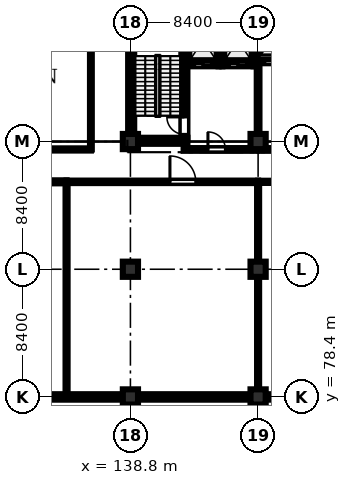
"""IFC4 building model, lengths in metres.
Left out: names, types, materials, properties, quantities, classifications, styles, units other than length and angle.
Written with IfcOpenShell. Run it as: python <this file> out.ifc"""

import sys

from ifc_helpers import new_model, si_unit, direction, frame, frame_2d, origin, origin_2d, place, context, subcontext, project, spatial, rectangle, extrude, element, fill, save


model = new_model("IFC4")
c1 = context("Model", 3, precision=1e-05, world=origin(), true_north=direction((0.0, 1.0)))
c2 = subcontext(c1, "Body", "Model", "MODEL_VIEW")
j1 = project(units=[si_unit("LENGTHUNIT", "METRE"), si_unit("PLANEANGLEUNIT", "RADIAN")], contexts=[c1])
p1 = place(None, origin())
s1 = spatial("IfcSite", under=j1, at=p1, CompositionType="ELEMENT")
p2 = place(p1, origin())
s2 = spatial("IfcBuilding", under=s1, at=p2, CompositionType="ELEMENT")
p3 = place(p2, frame((0.0, 0.0, 5.4)))
s3 = spatial("IfcBuildingStorey", under=s2, at=p3, CompositionType="ELEMENT", Elevation=5.4)
for number, where, z_axis, x_axis in (
    (1, (138.8, 78.4, 0.0), (0.0, 0.0, 1.0), (1.0, 0.0, 0.0)),
    (2, (138.8, 86.8, 0.0), (0.0, 0.0, 1.0), (1.0, 0.0, 0.0)),
    (3, (138.8, 95.2, 0.0), (0.0, 0.0, 1.0), (1.0, 0.0, 0.0)),
    (4, (147.2, 78.4, 0.0), (0.0, 0.0, 1.0), (1.0, 0.0, 0.0)),
    (5, (147.2, 86.8, 0.0), (0.0, 0.0, 1.0), (1.0, 0.0, 0.0)),
    (6, (147.2, 95.2, 0.0), (0.0, 0.0, 1.0), (1.0, 0.0, 0.0)),
):
    element("IfcColumn", number, at=place(p3, frame(where, z_axis=z_axis, x_axis=x_axis)), inside=s3, PredefinedType="COLUMN", context=c2, shape_type="SweptSolid", body=[
        extrude(rectangle(XDim=1.0, YDim=1.0, at=origin_2d()), origin(), (0.0, 0.0, 1.0), 4.58),
    ])
p4 = place(p3, frame((138.65, 95.25, 0.0), z_axis=(0.0, 0.0, 1.0), x_axis=(1.0, 0.0, 0.0)))
e7 = element("IfcWall", 7, at=p4, inside=s3, PredefinedType="SHEAR", context=c2, shape_type="SweptSolid", body=[
    extrude(rectangle(XDim=3.9, YDim=0.4, at=frame_2d((1.95, 0.0))), origin(), (0.0, 0.0, 1.0), 4.58),
])
p5 = place(p3, frame((138.85, 95.45, 0.0), z_axis=(0.0, 0.0, 1.0), x_axis=(0.0, 1.0, 0.0)))
e8 = element("IfcWall", 8, at=p5, inside=s3, PredefinedType="SHEAR", context=c2, shape_type="SweptSolid", body=[
    extrude(rectangle(XDim=7.9, YDim=0.4, at=frame_2d((3.95, 0.0))), origin(), (0.0, 0.0, 1.0), 4.58),
])
p6 = place(p3, frame((142.35, 95.45, 0.0), z_axis=(0.0, 0.0, 1.0), x_axis=(0.0, 1.0, 0.0)))
e9 = element("IfcWall", 9, at=p6, inside=s3, PredefinedType="SHEAR", context=c2, shape_type="SweptSolid", body=[
    extrude(rectangle(XDim=7.9, YDim=0.4, at=frame_2d((3.95, 0.0))), origin(), (0.0, 0.0, 1.0), 4.58),
])
p7 = place(p6, frame((0.22, 0.0, 0.0)))
e10 = element("IfcOpeningElement", 10, at=p7, cuts=e9, PredefinedType="OPENING", context=c2, shape_type="SweptSolid", body=[
    extrude(rectangle(XDim=1.15, YDim=2.15, at=frame_2d((0.575, 1.075))), frame((0.0, 0.21, 0.0), z_axis=(0.0, -1.0, 0.0), x_axis=(1.0, 0.0, 0.0)), (0.0, 0.0, 1.0), 0.42),
])
p8 = place(p3, frame((142.55, 100.275, 0.0), z_axis=(0.0, 0.0, 1.0), x_axis=(1.0, 0.0, 0.0)))
e11 = element("IfcWall", 11, at=p8, inside=s3, PredefinedType="SHEAR", context=c2, shape_type="SweptSolid", body=[
    extrude(rectangle(XDim=2.05, YDim=0.25, at=frame_2d((1.025, 0.0))), origin(), (0.0, 0.0, 1.0), 4.58),
])
p9 = place(p8, frame((0.475, 0.0, 0.0)))
e12 = element("IfcOpeningElement", 12, at=p9, cuts=e11, PredefinedType="OPENING", context=c2, shape_type="SweptSolid", body=[
    extrude(rectangle(XDim=1.1, YDim=2.15, at=frame_2d((0.55, 1.075))), frame((0.0, 0.135, 0.0), z_axis=(0.0, -1.0, 0.0), x_axis=(1.0, 0.0, 0.0)), (0.0, 0.0, 1.0), 0.27),
])
p10 = place(p3, frame((144.725, 100.15, 0.0), z_axis=(0.0, 0.0, 1.0), x_axis=(0.0, 1.0, 0.0)))
e13 = element("IfcWall", 13, at=p10, inside=s3, PredefinedType="SHEAR", context=c2, shape_type="SweptSolid", body=[
    extrude(rectangle(XDim=3.4, YDim=0.25, at=frame_2d((1.7, 0.0))), origin(), (0.0, 0.0, 1.0), 4.58),
])
p11 = place(p3, frame((144.85, 100.275, 0.0), z_axis=(0.0, 0.0, 1.0), x_axis=(1.0, 0.0, 0.0)))
e14 = element("IfcWall", 14, at=p11, inside=s3, PredefinedType="SHEAR", context=c2, shape_type="SweptSolid", body=[
    extrude(rectangle(XDim=2.05, YDim=0.25, at=frame_2d((1.025, 0.0))), origin(), (0.0, 0.0, 1.0), 4.58),
])
p12 = place(p11, frame((0.465, 0.0, 0.0)))
e15 = element("IfcOpeningElement", 15, at=p12, cuts=e14, PredefinedType="OPENING", context=c2, shape_type="SweptSolid", body=[
    extrude(rectangle(XDim=1.12, YDim=2.15, at=frame_2d((0.56, 1.075))), frame((0.0, 0.135, 0.0), z_axis=(0.0, -1.0, 0.0), x_axis=(1.0, 0.0, 0.0)), (0.0, 0.0, 1.0), 0.27),
])
p13 = place(p3, frame((147.025, 100.15, 0.0), z_axis=(0.0, 0.0, 1.0), x_axis=(0.0, 1.0, 0.0)))
e16 = element("IfcWall", 16, at=p13, inside=s3, PredefinedType="SHEAR", context=c2, shape_type="SweptSolid", body=[
    extrude(rectangle(XDim=3.4, YDim=0.25, at=frame_2d((1.7, 0.0))), origin(), (0.0, 0.0, 1.0), 4.58),
])
p14 = place(p3, frame((147.15, 100.475, 0.0), z_axis=(0.0, 0.0, 1.0), x_axis=(1.0, 0.0, 0.0)))
e17 = element("IfcWall", 17, at=p14, inside=s3, PredefinedType="SHEAR", context=c2, shape_type="SweptSolid", body=[
    extrude(rectangle(XDim=2.05, YDim=0.25, at=frame_2d((1.025, 0.0))), origin(), (0.0, 0.0, 1.0), 4.58),
])
p15 = place(p14, frame((0.495, 0.0, 0.0)))
e18 = element("IfcOpeningElement", 18, at=p15, cuts=e17, PredefinedType="OPENING", context=c2, shape_type="SweptSolid", body=[
    extrude(rectangle(XDim=1.06, YDim=2.15, at=frame_2d((0.53, 1.075))), frame((0.0, 0.135, 0.0), z_axis=(0.0, -1.0, 0.0), x_axis=(1.0, 0.0, 0.0)), (0.0, 0.0, 1.0), 0.27),
])
p16 = place(p3, frame((138.3, 78.4, 0.0), z_axis=(0.0, 0.0, 1.0), x_axis=(-1.0, 0.0, 0.0)))
e19 = element("IfcWall", 19, at=p16, inside=s3, PredefinedType="STANDARD", context=c2, shape_type="SweptSolid", body=[
    extrude(rectangle(XDim=7.4, YDim=0.36, at=frame_2d((3.7, 0.0))), origin(), (0.0, 0.0, 1.0), 3.83),
])
p17 = place(p16, frame((1.15, 0.0, 0.95)))
e20 = element("IfcOpeningElement", 20, at=p17, cuts=e19, PredefinedType="OPENING", context=c2, shape_type="SweptSolid", body=[
    extrude(rectangle(XDim=1.5, YDim=1.5, at=frame_2d((0.75, 0.75))), frame((0.0, 0.19, 0.0), z_axis=(0.0, -1.0, 0.0), x_axis=(1.0, 0.0, 0.0)), (0.0, 0.0, 1.0), 0.38),
])
p18 = place(p3, frame((146.7, 78.4, 0.0), z_axis=(0.0, 0.0, 1.0), x_axis=(-1.0, 0.0, 0.0)))
e21 = element("IfcWall", 21, at=p18, inside=s3, PredefinedType="STANDARD", context=c2, shape_type="SweptSolid", body=[
    extrude(rectangle(XDim=7.4, YDim=0.36, at=frame_2d((3.7, 0.0))), origin(), (0.0, 0.0, 1.0), 3.83),
])
p19 = place(p18, frame((1.15, 0.0, 0.95)))
e22 = element("IfcOpeningElement", 22, at=p19, cuts=e21, PredefinedType="OPENING", context=c2, shape_type="SweptSolid", body=[
    extrude(rectangle(XDim=1.5, YDim=1.5, at=frame_2d((0.75, 0.75))), frame((0.0, 0.19, 0.0), z_axis=(0.0, -1.0, 0.0), x_axis=(1.0, 0.0, 0.0)), (0.0, 0.0, 1.0), 0.38),
])
p20 = place(p3, frame((155.1, 78.4, 0.0), z_axis=(0.0, 0.0, 1.0), x_axis=(-1.0, 0.0, 0.0)))
e23 = element("IfcWall", 23, at=p20, inside=s3, PredefinedType="STANDARD", context=c2, shape_type="SweptSolid", body=[
    extrude(rectangle(XDim=7.4, YDim=0.36, at=frame_2d((3.7, 0.0))), origin(), (0.0, 0.0, 1.0), 3.83),
])
p21 = place(p20, frame((1.15, 0.0, 0.95)))
e24 = element("IfcOpeningElement", 24, at=p21, cuts=e23, PredefinedType="OPENING", context=c2, shape_type="SweptSolid", body=[
    extrude(rectangle(XDim=1.5, YDim=1.5, at=frame_2d((0.75, 0.75))), frame((0.0, 0.19, 0.0), z_axis=(0.0, -1.0, 0.0), x_axis=(1.0, 0.0, 0.0)), (0.0, 0.0, 1.0), 0.38),
])
p22 = place(p3, frame((147.185, 49.68, 0.0), z_axis=(0.0, 0.0, 1.0), x_axis=(0.0, 1.0, 0.0)))
e25 = element("IfcWall", 25, at=p22, inside=s3, PredefinedType="PARAPET", context=c2, shape_type="SweptSolid", body=[
    extrude(rectangle(XDim=28.54, YDim=0.19, at=frame_2d((14.27, 0.0))), origin(), (0.0, 0.0, 1.0), 1.2),
])
p23 = place(p3, frame((142.3, 94.68, 0.0), z_axis=(0.0, 0.0, 1.0), x_axis=(1.0, 0.0, 0.0)))
e26 = element("IfcWall", 26, at=p23, inside=s3, PredefinedType="STANDARD", context=c2, shape_type="SweptSolid", body=[
    extrude(rectangle(XDim=4.8, YDim=0.18, at=frame_2d((2.4, 0.0))), origin(), (0.0, 0.0, 1.0), 4.58),
])
p24 = place(p23, frame((1.6, 0.0, 0.0)))
e27 = element("IfcOpeningElement", 27, at=p24, cuts=e26, PredefinedType="OPENING", context=c2, shape_type="SweptSolid", body=[
    extrude(rectangle(XDim=1.15, YDim=2.15, at=frame_2d((0.575, 1.075))), frame((0.0, 0.1, 0.0), z_axis=(0.0, -1.0, 0.0), x_axis=(1.0, 0.0, 0.0)), (0.0, 0.0, 1.0), 0.2),
])
p25 = place(p3, frame((147.3, 94.68, 0.0), z_axis=(0.0, 0.0, 1.0), x_axis=(1.0, 0.0, 0.0)))
e28 = element("IfcWall", 28, at=p25, inside=s3, PredefinedType="STANDARD", context=c2, shape_type="SweptSolid", body=[
    extrude(rectangle(XDim=4.85, YDim=0.18, at=frame_2d((2.425, 0.0))), origin(), (0.0, 0.0, 1.0), 4.58),
])
p26 = place(p25, frame((1.6, 0.0, 0.0)))
e29 = element("IfcOpeningElement", 29, at=p26, cuts=e28, PredefinedType="OPENING", context=c2, shape_type="SweptSolid", body=[
    extrude(rectangle(XDim=1.15, YDim=2.15, at=frame_2d((0.575, 1.075))), frame((0.0, 0.1, 0.0), z_axis=(0.0, -1.0, 0.0), x_axis=(1.0, 0.0, 0.0)), (0.0, 0.0, 1.0), 0.2),
])
p27 = place(p3, frame((147.2, 95.75, 0.0), z_axis=(0.0, 0.0, 1.0), x_axis=(0.0, 1.0, 0.0)))
e30 = element("IfcWall", 30, at=p27, inside=s3, PredefinedType="STANDARD", context=c2, shape_type="SweptSolid", body=[
    extrude(rectangle(XDim=4.5, YDim=0.18, at=frame_2d((2.25, 0.0))), origin(), (0.0, 0.0, 1.0), 3.83),
])
p28 = place(p3, frame((136.2, 94.68, 0.0), z_axis=(0.0, 0.0, 1.0), x_axis=(0.0, 1.0, 0.0)))
e31 = element("IfcWall", 31, at=p28, inside=s3, PredefinedType="PARTITIONING", context=c2, shape_type="SweptSolid", body=[
    extrude(rectangle(XDim=9.07, YDim=0.12, at=frame_2d((4.535, 0.0))), origin(), (0.0, 0.0, 1.0), 4.58),
])
p29 = place(p3, frame((122.4, 94.68, 0.0), z_axis=(0.0, 0.0, 1.0), x_axis=(1.0, 0.0, 0.0)))
e32 = element("IfcWall", 32, at=p29, inside=s3, PredefinedType="PARTITIONING", context=c2, shape_type="SweptSolid", body=[
    extrude(rectangle(XDim=13.8, YDim=0.145, at=frame_2d((6.9, 0.0))), origin(), (0.0, 0.0, 1.0), 4.58),
])
p30 = place(p29, frame((3.2, 0.0, 0.0)))
e33 = element("IfcOpeningElement", 33, at=p30, cuts=e32, PredefinedType="OPENING", context=c2, shape_type="SweptSolid", body=[
    extrude(rectangle(XDim=1.02, YDim=2.15, at=frame_2d((0.51, 1.075))), frame((0.0, 0.083, 0.0), z_axis=(0.0, -1.0, 0.0), x_axis=(1.0, 0.0, 0.0)), (0.0, 0.0, 1.0), 0.165),
])
p31 = place(p3, frame((122.15, 92.55, 0.0), z_axis=(0.0, 0.0, 1.0), x_axis=(1.0, 0.0, 0.0)))
e34 = element("IfcWall", 34, at=p31, inside=s3, PredefinedType="SOLIDWALL", context=c2, shape_type="SweptSolid", body=[
    extrude(rectangle(XDim=12.45, YDim=0.2, at=frame_2d((6.225, 0.0))), origin(), (0.0, 0.0, 1.0), 4.58),
])
p32 = place(p31, frame((3.75, 0.0, 0.0)))
e35 = element("IfcOpeningElement", 35, at=p32, cuts=e34, PredefinedType="OPENING", context=c2, shape_type="SweptSolid", body=[
    extrude(rectangle(XDim=1.5, YDim=2.2, at=frame_2d((0.75, 1.1))), frame((0.0, 0.11, 0.0), z_axis=(0.0, -1.0, 0.0), x_axis=(1.0, 0.0, 0.0)), (0.0, 0.0, 1.0), 0.22),
])
p33 = place(p3, frame((134.6, 92.55, 0.0), z_axis=(0.0, 0.0, 1.0), x_axis=(1.0, 0.0, 0.0)))
e36 = element("IfcWall", 36, at=p33, inside=s3, PredefinedType="PARTITIONING", context=c2, shape_type="SweptSolid", body=[
    extrude(rectangle(XDim=12.6, YDim=0.165, at=frame_2d((6.3, 0.0))), origin(), (0.0, 0.0, 1.0), 4.58),
])
p34 = place(p33, frame((6.8, 0.0, 0.0)))
e37 = element("IfcOpeningElement", 37, at=p34, cuts=e36, PredefinedType="OPENING", context=c2, shape_type="SweptSolid", body=[
    extrude(rectangle(XDim=1.7, YDim=2.2, at=frame_2d((0.85, 1.1))), frame((0.0, 0.093, 0.0), z_axis=(0.0, -1.0, 0.0), x_axis=(1.0, 0.0, 0.0)), (0.0, 0.0, 1.0), 0.185),
])
p35 = place(p3, frame((134.6, 78.55, 0.0), z_axis=(0.0, 0.0, 1.0), x_axis=(0.0, 1.0, 0.0)))
e38 = element("IfcWall", 38, at=p35, inside=s3, PredefinedType="PARTITIONING", context=c2, shape_type="SweptSolid", body=[
    extrude(rectangle(XDim=14.0, YDim=0.135, at=frame_2d((7.0, 0.0))), origin(), (0.0, 0.0, 1.0), 4.03),
])
p36 = place(p3, frame((147.2, 92.55, 0.0), z_axis=(0.0, 0.0, 1.0), x_axis=(1.0, 0.0, 0.0)))
e39 = element("IfcWall", 39, at=p36, inside=s3, PredefinedType="PARTITIONING", context=c2, shape_type="SweptSolid", body=[
    extrude(rectangle(XDim=16.15, YDim=0.145, at=frame_2d((8.075, 0.0))), origin(), (0.0, 0.0, 1.0), 4.58),
])
p37 = place(p36, frame((3.4, 0.0, 0.0)))
e40 = element("IfcOpeningElement", 40, at=p37, cuts=e39, PredefinedType="OPENING", context=c2, shape_type="SweptSolid", body=[
    extrude(rectangle(XDim=1.08, YDim=2.15, at=frame_2d((0.54, 1.075))), frame((0.0, 0.083, 0.0), z_axis=(0.0, -1.0, 0.0), x_axis=(1.0, 0.0, 0.0)), (0.0, 0.0, 1.0), 0.165),
])
p38 = place(p3, frame((147.2, 78.55, 0.0), z_axis=(0.0, 0.0, 1.0), x_axis=(0.0, 1.0, 0.0)))
e41 = element("IfcWall", 41, at=p38, inside=s3, PredefinedType="PARTITIONING", context=c2, shape_type="SweptSolid", body=[
    extrude(rectangle(XDim=14.0, YDim=0.135, at=frame_2d((7.0, 0.0))), origin(), (0.0, 0.0, 1.0), 3.83),
])
p39 = place(p17, origin())
e42 = element("IfcWindow", 42, at=p39, inside=s3, PartitioningType="DOUBLE_PANEL_VERTICAL", PredefinedType="WINDOW", context=c2, shape_type="SweptSolid", body=[
    extrude(rectangle(XDim=1.5, YDim=1.5, at=frame_2d((0.75, 0.75))), frame((0.0, 0.03, 0.0), z_axis=(0.0, -1.0, 0.0), x_axis=(1.0, 0.0, 0.0)), (0.0, 0.0, 1.0), 0.06),
])
fill(e20, e42)
p40 = place(p19, origin())
e43 = element("IfcWindow", 43, at=p40, inside=s3, PartitioningType="DOUBLE_PANEL_VERTICAL", PredefinedType="WINDOW", context=c2, shape_type="SweptSolid", body=[
    extrude(rectangle(XDim=1.5, YDim=1.5, at=frame_2d((0.75, 0.75))), frame((0.0, 0.03, 0.0), z_axis=(0.0, -1.0, 0.0), x_axis=(1.0, 0.0, 0.0)), (0.0, 0.0, 1.0), 0.06),
])
fill(e22, e43)
p41 = place(p24, origin())
e44 = element("IfcDoor", 44, at=p41, inside=s3, OperationType="SINGLE_SWING_LEFT", PredefinedType="DOOR", context=c2, shape_type="SweptSolid", body=[
    extrude(rectangle(XDim=1.15, YDim=2.15, at=frame_2d((0.575, 1.075))), frame((0.0, 0.025, 0.0), z_axis=(0.0, -1.0, 0.0), x_axis=(1.0, 0.0, 0.0)), (0.0, 0.0, 1.0), 0.05),
])
fill(e27, e44)
p42 = place(p34, origin())
e45 = element("IfcDoor", 45, at=p42, inside=s3, OperationType="SINGLE_SWING_LEFT", PredefinedType="DOOR", context=c2, shape_type="SweptSolid", body=[
    extrude(rectangle(XDim=1.7, YDim=2.2, at=frame_2d((0.85, 1.1))), frame((0.0, 0.025, 0.0), z_axis=(0.0, -1.0, 0.0), x_axis=(1.0, 0.0, 0.0)), (0.0, 0.0, 1.0), 0.05),
])
fill(e37, e45)
p43 = place(p7, origin())
e46 = element("IfcDoor", 46, at=p43, inside=s3, OperationType="SINGLE_SWING_RIGHT", PredefinedType="DOOR", context=c2, shape_type="SweptSolid", body=[
    extrude(rectangle(XDim=1.15, YDim=2.15, at=frame_2d((0.575, 1.075))), frame((0.0, 0.025, 0.0), z_axis=(0.0, -1.0, 0.0), x_axis=(1.0, 0.0, 0.0)), (0.0, 0.0, 1.0), 0.05),
])
fill(e10, e46)
p44 = place(p9, origin())
e47 = element("IfcDoor", 47, at=p44, inside=s3, OperationType="SLIDING_TO_LEFT", PredefinedType="DOOR", context=c2, shape_type="SweptSolid", body=[
    extrude(rectangle(XDim=1.1, YDim=2.15, at=frame_2d((0.55, 1.075))), frame((0.0, 0.025, 0.0), z_axis=(0.0, -1.0, 0.0), x_axis=(1.0, 0.0, 0.0)), (0.0, 0.0, 1.0), 0.05),
])
fill(e12, e47)
p45 = place(p12, origin())
e48 = element("IfcDoor", 48, at=p45, inside=s3, OperationType="SLIDING_TO_LEFT", PredefinedType="DOOR", context=c2, shape_type="SweptSolid", body=[
    extrude(rectangle(XDim=1.12, YDim=2.15, at=frame_2d((0.56, 1.075))), frame((0.0, 0.025, 0.0), z_axis=(0.0, -1.0, 0.0), x_axis=(1.0, 0.0, 0.0)), (0.0, 0.0, 1.0), 0.05),
])
fill(e15, e48)
p46 = place(p15, origin())
e49 = element("IfcDoor", 49, at=p46, inside=s3, OperationType="SLIDING_TO_LEFT", PredefinedType="DOOR", context=c2, shape_type="SweptSolid", body=[
    extrude(rectangle(XDim=1.06, YDim=2.15, at=frame_2d((0.53, 1.075))), frame((0.0, 0.025, 0.0), z_axis=(0.0, -1.0, 0.0), x_axis=(1.0, 0.0, 0.0)), (0.0, 0.0, 1.0), 0.05),
])
fill(e18, e49)
save(model, sys.argv[1])
